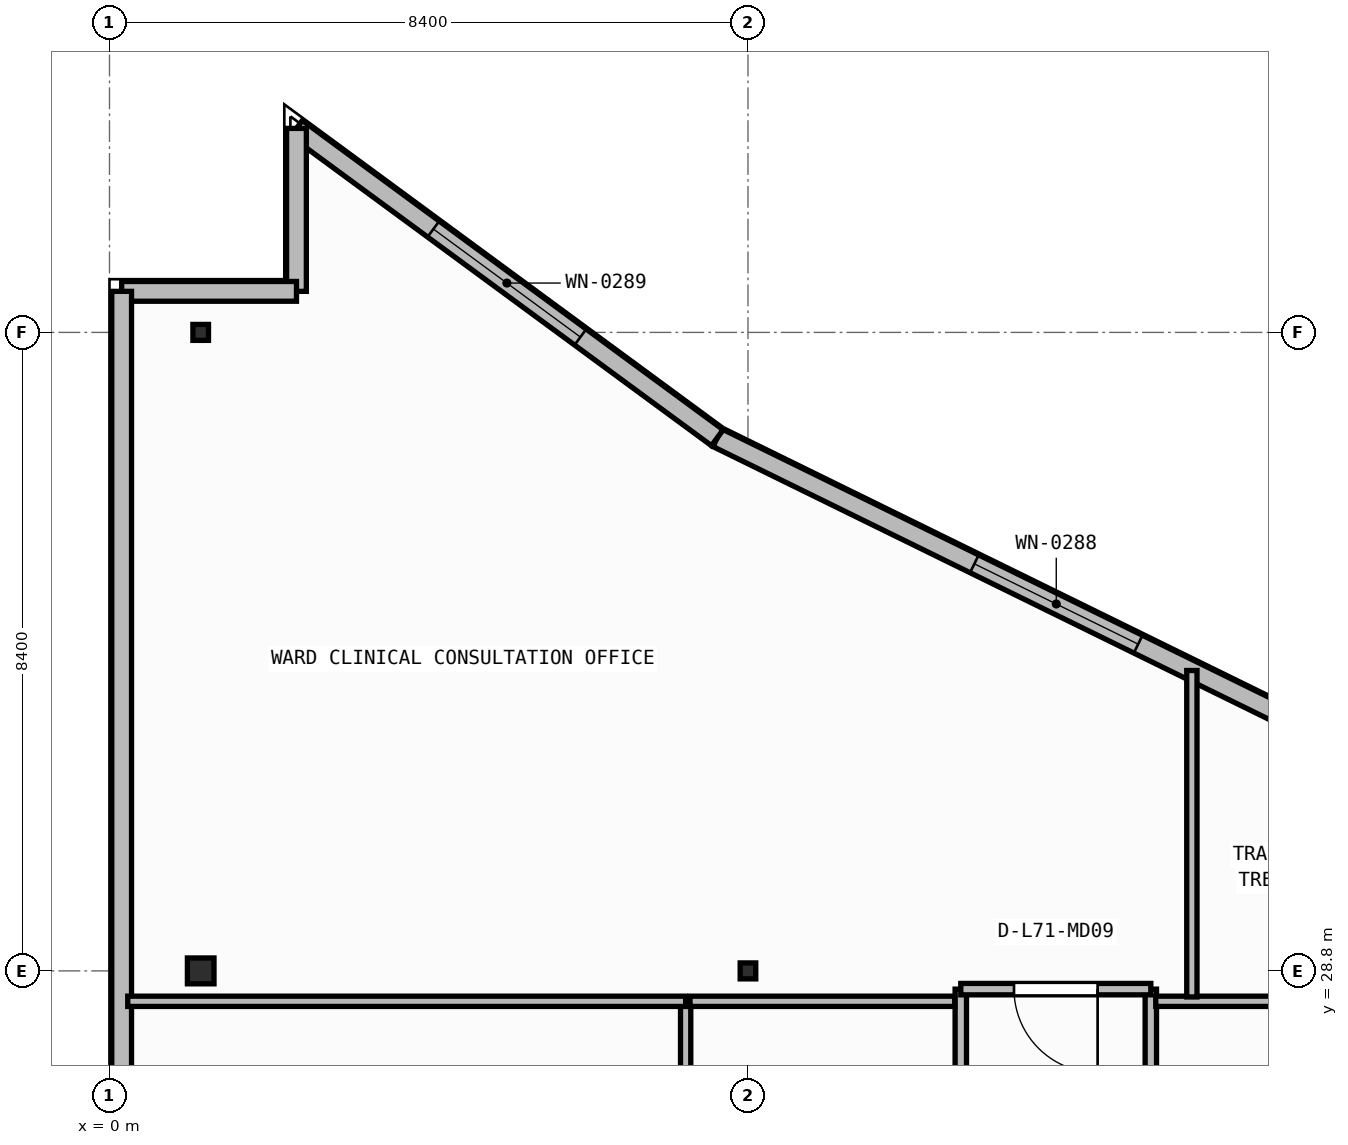
"""IFC4 building model, lengths in metres.
Left out: names, types, materials, properties, quantities, classifications, styles, units other than length and angle.
Written with IfcOpenShell. Run it as: python <this file> out.ifc"""

import sys

from ifc_helpers import new_model, si_unit, direction, frame, frame_2d, origin, origin_2d, place, context, subcontext, project, spatial, rectangle, i_section, extrude, element, fill, save


model = new_model("IFC4")
c1 = context("Model", 3, precision=1e-05, world=origin(), true_north=direction((0.0, 1.0)))
c2 = subcontext(c1, "Body", "Model", "MODEL_VIEW")
j1 = project(units=[si_unit("LENGTHUNIT", "METRE"), si_unit("PLANEANGLEUNIT", "RADIAN")], contexts=[c1])
p1 = place(None, origin())
s1 = spatial("IfcSite", under=j1, at=p1, CompositionType="ELEMENT")
p2 = place(p1, origin())
s2 = spatial("IfcBuilding", under=s1, at=p2, CompositionType="ELEMENT")
p3 = place(p2, frame((0.0, 0.0, 288.15)))
s3 = spatial("IfcBuildingStorey", under=s2, at=p3, CompositionType="ELEMENT", Elevation=288.15)
p4 = place(p3, frame((1.2, 28.8, 0.0), z_axis=(0.0, 0.0, 1.0), x_axis=(1.0, 0.0, 0.0)))
e1 = element("IfcColumn", 1, at=p4, inside=s3, PredefinedType="COLUMN", context=c2, shape_type="SweptSolid", body=[
    extrude(i_section(OverallWidth=0.35, OverallDepth=0.34, WebThickness=0.016, FlangeThickness=0.028, at=origin_2d()), origin(), (0.0, 0.0, 1.0), 3.95),
])
for number, where, z_axis, x_axis in (
    (2, (8.4, 28.8, 0.0), (0.0, 0.0, 1.0), (1.0, 0.0, 0.0)),
    (3, (1.2, 37.2, 0.0), (0.0, 0.0, 1.0), (1.0, 0.0, 0.0)),
):
    element("IfcColumn", number, at=place(p3, frame(where, z_axis=z_axis, x_axis=x_axis)), inside=s3, PredefinedType="COLUMN", context=c2, shape_type="SweptSolid", body=[
        extrude(i_section(OverallWidth=0.205, OverallDepth=0.21, WebThickness=0.009, FlangeThickness=0.014, FilletRadius=0.011, at=origin_2d()), origin(), (0.0, 0.0, 1.0), 3.95),
    ])
p5 = place(p3, frame((16.915, 31.44, 0.0), z_axis=(0.0, 0.0, 1.0), x_axis=(-0.897793077248, 0.440417518322, 0.0)))
e4 = element("IfcWall", 4, at=p5, inside=s3, PredefinedType="STANDARD", context=c2, shape_type="SweptSolid", body=[
    extrude(rectangle(XDim=9.934, YDim=0.26, at=frame_2d((4.967, 0.0))), origin(), (0.0, 0.0, 1.0), 3.71),
])
p6 = place(p5, frame((3.767, 0.0, 0.9)))
e5 = element("IfcOpeningElement", 5, at=p6, cuts=e4, PredefinedType="OPENING", context=c2, shape_type="SweptSolid", body=[
    extrude(rectangle(XDim=2.4, YDim=1.65, at=frame_2d((1.2, 0.825))), frame((0.0, 0.14, 0.0), z_axis=(0.0, -1.0, 0.0), x_axis=(1.0, 0.0, 0.0)), (0.0, 0.0, 1.0), 0.28),
])
p7 = place(p3, frame((7.997, 35.815, 0.0), z_axis=(0.0, 0.0, 1.0), x_axis=(-0.805786654178, 0.592205933733, 0.0)))
e6 = element("IfcWall", 6, at=p7, inside=s3, PredefinedType="STANDARD", context=c2, shape_type="SweptSolid", body=[
    extrude(rectangle(XDim=6.871, YDim=0.26, at=frame_2d((3.436, 0.0))), origin(), (0.0, 0.0, 1.0), 3.71),
])
p8 = place(p7, frame((2.236, 0.0, 0.9)))
e7 = element("IfcOpeningElement", 7, at=p8, cuts=e6, PredefinedType="OPENING", context=c2, shape_type="SweptSolid", body=[
    extrude(rectangle(XDim=2.4, YDim=1.65, at=frame_2d((1.2, 0.825))), frame((0.0, 0.14, 0.0), z_axis=(0.0, -1.0, 0.0), x_axis=(1.0, 0.0, 0.0)), (0.0, 0.0, 1.0), 0.28),
])
p9 = place(p3, frame((2.46, 39.884, 0.0), z_axis=(0.0, 0.0, 1.0), x_axis=(0.0, -1.0, 0.0)))
e8 = element("IfcWall", 8, at=p9, inside=s3, PredefinedType="STANDARD", context=c2, shape_type="SweptSolid", body=[
    extrude(rectangle(XDim=2.144, YDim=0.26, at=frame_2d((1.072, 0.0))), origin(), (0.0, 0.0, 1.0), 3.71),
])
p10 = place(p3, frame((2.46, 37.74, 0.0), z_axis=(0.0, 0.0, 1.0), x_axis=(-1.0, 0.0, 0.0)))
e9 = element("IfcWall", 9, at=p10, inside=s3, PredefinedType="STANDARD", context=c2, shape_type="SweptSolid", body=[
    extrude(rectangle(XDim=2.3, YDim=0.26, at=frame_2d((1.15, 0.0))), origin(), (0.0, 0.0, 1.0), 3.71),
])
p11 = place(p3, frame((0.16, 37.74, 0.0), z_axis=(0.0, 0.0, 1.0), x_axis=(0.0, -1.0, 0.0)))
e10 = element("IfcWall", 10, at=p11, inside=s3, PredefinedType="STANDARD", context=c2, shape_type="SweptSolid", body=[
    extrude(rectangle(XDim=35.28, YDim=0.26, at=frame_2d((17.64, 0.0))), origin(), (0.0, 0.0, 1.0), 3.71),
])
p12 = place(p11, frame((13.07, 0.0, 0.0)))
e11 = element("IfcOpeningElement", 11, at=p12, cuts=e10, PredefinedType="OPENING", context=c2, shape_type="SweptSolid", body=[
    extrude(rectangle(XDim=1.3, YDim=2.15, at=frame_2d((0.65, 1.075))), frame((0.0, 0.14, 0.0), z_axis=(0.0, -1.0, 0.0), x_axis=(1.0, 0.0, 0.0)), (0.0, 0.0, 1.0), 0.28),
])
p13 = place(p3, frame((11.2, 28.56, 0.0), z_axis=(0.0, 0.0, 1.0), x_axis=(0.0, -1.0, 0.0)))
e12 = element("IfcWall", 12, at=p13, inside=s3, PredefinedType="PARTITIONING", context=c2, shape_type="SweptSolid", body=[
    extrude(rectangle(XDim=7.812, YDim=0.15, at=frame_2d((3.906, 0.0))), origin(), (0.0, 0.0, 1.0), 3.71),
])
p14 = place(p13, frame((3.356, 0.0, 0.0)))
e13 = element("IfcOpeningElement", 13, at=p14, cuts=e12, PredefinedType="OPENING", context=c2, shape_type="SweptSolid", body=[
    extrude(rectangle(XDim=1.1, YDim=2.1, at=frame_2d((0.55, 1.05))), frame((0.0, 0.085, 0.0), z_axis=(0.0, -1.0, 0.0), x_axis=(1.0, 0.0, 0.0)), (0.0, 0.0, 1.0), 0.17),
])
p15 = place(p3, frame((13.7, 20.594, 0.0), z_axis=(0.0, 0.0, 1.0), x_axis=(0.0, 1.0, 0.0)))
e14 = element("IfcWall", 14, at=p15, inside=s3, PredefinedType="PARTITIONING", context=c2, shape_type="SweptSolid", body=[
    extrude(rectangle(XDim=7.966, YDim=0.15, at=frame_2d((3.983, 0.0))), origin(), (0.0, 0.0, 1.0), 3.71),
])
p16 = place(p15, frame((3.433, 0.0, 0.0)))
e15 = element("IfcOpeningElement", 15, at=p16, cuts=e14, PredefinedType="OPENING", context=c2, shape_type="SweptSolid", body=[
    extrude(rectangle(XDim=1.1, YDim=2.1, at=frame_2d((0.55, 1.05))), frame((0.0, 0.085, 0.0), z_axis=(0.0, -1.0, 0.0), x_axis=(1.0, 0.0, 0.0)), (0.0, 0.0, 1.0), 0.17),
])
p17 = place(p3, frame((13.7, 28.56, 0.0), z_axis=(0.0, 0.0, 1.0), x_axis=(-1.0, 0.0, 0.0)))
e16 = element("IfcWall", 16, at=p17, inside=s3, PredefinedType="PARTITIONING", context=c2, shape_type="SweptSolid", body=[
    extrude(rectangle(XDim=2.5, YDim=0.15, at=frame_2d((1.25, 0.0))), origin(), (0.0, 0.0, 1.0), 3.157),
])
p18 = place(p17, frame((0.7, 0.0, 0.0)))
e17 = element("IfcOpeningElement", 17, at=p18, cuts=e16, PredefinedType="OPENING", context=c2, shape_type="SweptSolid", body=[
    extrude(rectangle(XDim=1.1, YDim=2.1, at=frame_2d((0.55, 1.05))), frame((0.0, 0.085, 0.0), z_axis=(0.0, -1.0, 0.0), x_axis=(1.0, 0.0, 0.0)), (0.0, 0.0, 1.0), 0.17),
])
p19 = place(p3, frame((7.58, 20.577, 0.0), z_axis=(0.0, 0.0, 1.0), x_axis=(0.0, 1.0, 0.0)))
e18 = element("IfcWall", 18, at=p19, inside=s3, PredefinedType="PARTITIONING", context=c2, shape_type="SweptSolid", body=[
    extrude(rectangle(XDim=7.823, YDim=0.135, at=frame_2d((3.911, 0.0))), origin(), (0.0, 0.0, 1.0), 3.71),
])
p20 = place(p3, frame((7.58, 28.4, 0.0), z_axis=(0.0, 0.0, 1.0), x_axis=(-1.0, 0.0, 0.0)))
e19 = element("IfcWall", 19, at=p20, inside=s3, PredefinedType="PARTITIONING", context=c2, shape_type="SweptSolid", body=[
    extrude(rectangle(XDim=7.34, YDim=0.135, at=frame_2d((3.67, 0.0))), origin(), (0.0, 0.0, 1.0), 3.157),
])
p21 = place(p3, frame((11.12, 28.4, 0.0), z_axis=(0.0, 0.0, 1.0), x_axis=(-1.0, 0.0, 0.0)))
e20 = element("IfcWall", 20, at=p21, inside=s3, PredefinedType="PARTITIONING", context=c2, shape_type="SweptSolid", body=[
    extrude(rectangle(XDim=3.483, YDim=0.135, at=frame_2d((1.741, 0.0))), origin(), (0.0, 0.0, 1.0), 3.157),
])
p22 = place(p3, frame((20.319, 28.4, 0.0), z_axis=(0.0, 0.0, 1.0), x_axis=(-1.0, 0.0, 0.0)))
e21 = element("IfcWall", 21, at=p22, inside=s3, PredefinedType="PARTITIONING", context=c2, shape_type="SweptSolid", body=[
    extrude(rectangle(XDim=6.554, YDim=0.135, at=frame_2d((3.277, 0.0))), origin(), (0.0, 0.0, 1.0), 3.157),
])
p23 = place(p22, frame((0.326, 0.0, 0.0)))
e22 = element("IfcOpeningElement", 22, at=p23, cuts=e21, PredefinedType="OPENING", context=c2, shape_type="SweptSolid", body=[
    extrude(rectangle(XDim=1.1, YDim=2.1, at=frame_2d((0.55, 1.05))), frame((0.0, 0.077, 0.0), z_axis=(0.0, -1.0, 0.0), x_axis=(1.0, 0.0, 0.0)), (0.0, 0.0, 1.0), 0.155),
])
p24 = place(p3, frame((14.24, 28.458, 0.0), z_axis=(0.0, 0.0, 1.0), x_axis=(0.0, 1.0, 0.0)))
e23 = element("IfcWall", 23, at=p24, inside=s3, PredefinedType="PARTITIONING", context=c2, shape_type="SweptSolid", body=[
    extrude(rectangle(XDim=4.294, YDim=0.135, at=frame_2d((2.147, 0.0))), origin(), (0.0, 0.0, 1.0), 3.71),
])
p25 = place(p6, origin())
e24 = element("IfcWindow", 24, at=p25, inside=s3, PartitioningType="SINGLE_PANEL", PredefinedType="WINDOW", context=c2, shape_type="SweptSolid", body=[
    extrude(rectangle(XDim=2.4, YDim=1.65, at=frame_2d((1.2, 0.825))), frame((0.0, 0.03, 0.0), z_axis=(0.0, -1.0, 0.0), x_axis=(1.0, 0.0, 0.0)), (0.0, 0.0, 1.0), 0.06),
])
fill(e5, e24)
p26 = place(p8, origin())
e25 = element("IfcWindow", 25, at=p26, inside=s3, PartitioningType="SINGLE_PANEL", PredefinedType="WINDOW", context=c2, shape_type="SweptSolid", body=[
    extrude(rectangle(XDim=2.4, YDim=1.65, at=frame_2d((1.2, 0.825))), frame((0.0, 0.03, 0.0), z_axis=(0.0, -1.0, 0.0), x_axis=(1.0, 0.0, 0.0)), (0.0, 0.0, 1.0), 0.06),
])
fill(e7, e25)
p27 = place(p18, origin())
e26 = element("IfcDoor", 26, at=p27, inside=s3, OperationType="SINGLE_SWING_LEFT", PredefinedType="DOOR", context=c2, shape_type="SweptSolid", body=[
    extrude(rectangle(XDim=1.1, YDim=2.1, at=frame_2d((0.55, 1.05))), frame((0.0, 0.025, 0.0), z_axis=(0.0, -1.0, 0.0), x_axis=(1.0, 0.0, 0.0)), (0.0, 0.0, 1.0), 0.05),
])
fill(e17, e26)
save(model, sys.argv[1])
